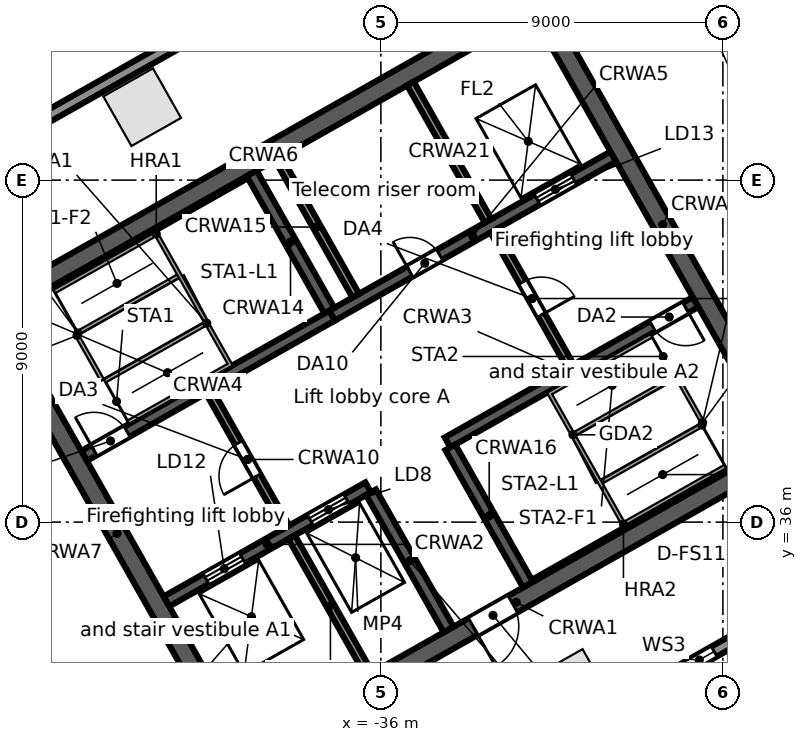
"""IFC4 building model, lengths in metres.
Left out: names, types, materials, properties, quantities, classifications, styles, units other than length and angle.
Written with IfcOpenShell. Run it as: python <this file> out.ifc"""

import sys

from ifc_helpers import new_model, si_unit, direction, frame, frame_2d, origin, origin_2d, place, context, subcontext, project, spatial, rectangle, extrude, element, fill, save


model = new_model("IFC4")
c1 = context("Model", 3, precision=1e-05, world=origin(), true_north=direction((0.0, 1.0)))
c2 = subcontext(c1, "Body", "Model", "MODEL_VIEW")
j1 = project(units=[si_unit("LENGTHUNIT", "METRE"), si_unit("PLANEANGLEUNIT", "RADIAN")], contexts=[c1])
p1 = place(None, origin())
s1 = spatial("IfcSite", under=j1, at=p1, CompositionType="ELEMENT")
p2 = place(p1, origin())
s2 = spatial("IfcBuilding", under=s1, at=p2, CompositionType="ELEMENT")
p3 = place(p2, frame((0.0, 0.0, 178.9)))
s3 = spatial("IfcBuildingStorey", under=s2, at=p3, CompositionType="ELEMENT", Elevation=178.9)
for number, where, z_axis, x_axis in (
    (1, (-42.28, 46.919, 0.0), (0.0, 0.0, 1.0), (-0.87, -0.492, 0.0)),
    (2, (-30.976, 31.635, 0.0), (0.0, 0.0, 1.0), (0.87, 0.492, 0.0)),
):
    element("IfcColumn", number, at=place(p3, frame(where, z_axis=z_axis, x_axis=x_axis)), inside=s3, PredefinedType="COLUMN", context=c2, shape_type="SweptSolid", body=[
        extrude(rectangle(XDim=1.5, YDim=1.5, at=origin_2d()), origin(), (0.0, 0.0, 1.0), 4.0),
    ])
p4 = place(p3, frame((-0.055, 47.969, 0.0), z_axis=(0.0, 0.0, 1.0), x_axis=(-0.870355730478, -0.492423499058, 0.0)))
e3 = element("IfcWall", 3, at=p4, inside=s3, PredefinedType="STANDARD", context=c2, shape_type="SweptSolid", body=[
    extrude(rectangle(XDim=43.75, YDim=0.3, at=frame_2d((21.875, 0.0))), origin(), (0.0, 0.0, 1.0), 3.68),
])
p5 = place(p4, frame((39.977, 0.0, 0.6)))
e4 = element("IfcOpeningElement", 4, at=p5, cuts=e3, PredefinedType="OPENING", context=c2, shape_type="SweptSolid", body=[
    extrude(rectangle(XDim=0.9, YDim=2.4, at=frame_2d((0.45, 1.2))), frame((0.0, 0.16, 0.0), z_axis=(0.0, -1.0, 0.0), x_axis=(1.0, 0.0, 0.0)), (0.0, 0.0, 1.0), 0.32),
])
p6 = place(p4, frame((37.338, 0.0, 0.0)))
e5 = element("IfcOpeningElement", 5, at=p6, cuts=e3, PredefinedType="OPENING", context=c2, shape_type="SweptSolid", body=[
    extrude(rectangle(XDim=1.8, YDim=2.4, at=frame_2d((0.9, 1.2))), frame((0.0, 0.16, 0.0), z_axis=(0.0, -1.0, 0.0), x_axis=(1.0, 0.0, 0.0)), (0.0, 0.0, 1.0), 0.32),
])
p7 = place(p4, frame((31.222, 0.0, 0.6)))
e6 = element("IfcOpeningElement", 6, at=p7, cuts=e3, PredefinedType="OPENING", context=c2, shape_type="SweptSolid", body=[
    extrude(rectangle(XDim=0.9, YDim=2.4, at=frame_2d((0.45, 1.2))), frame((0.0, 0.16, 0.0), z_axis=(0.0, -1.0, 0.0), x_axis=(1.0, 0.0, 0.0)), (0.0, 0.0, 1.0), 0.32),
])
p8 = place(p4, frame((28.584, 0.0, 0.0)))
e7 = element("IfcOpeningElement", 7, at=p8, cuts=e3, PredefinedType="OPENING", context=c2, shape_type="SweptSolid", body=[
    extrude(rectangle(XDim=1.8, YDim=2.4, at=frame_2d((0.9, 1.2))), frame((0.0, 0.16, 0.0), z_axis=(0.0, -1.0, 0.0), x_axis=(1.0, 0.0, 0.0)), (0.0, 0.0, 1.0), 0.32),
])
p9 = place(p4, frame((22.468, 0.0, 0.6)))
e8 = element("IfcOpeningElement", 8, at=p9, cuts=e3, PredefinedType="OPENING", context=c2, shape_type="SweptSolid", body=[
    extrude(rectangle(XDim=0.9, YDim=2.4, at=frame_2d((0.45, 1.2))), frame((0.0, 0.16, 0.0), z_axis=(0.0, -1.0, 0.0), x_axis=(1.0, 0.0, 0.0)), (0.0, 0.0, 1.0), 0.32),
])
p10 = place(p4, frame((19.829, 0.0, 0.0)))
e9 = element("IfcOpeningElement", 9, at=p10, cuts=e3, PredefinedType="OPENING", context=c2, shape_type="SweptSolid", body=[
    extrude(rectangle(XDim=1.8, YDim=2.4, at=frame_2d((0.9, 1.2))), frame((0.0, 0.16, 0.0), z_axis=(0.0, -1.0, 0.0), x_axis=(1.0, 0.0, 0.0)), (0.0, 0.0, 1.0), 0.32),
])
p11 = place(p4, frame((13.713, 0.0, 0.6)))
e10 = element("IfcOpeningElement", 10, at=p11, cuts=e3, PredefinedType="OPENING", context=c2, shape_type="SweptSolid", body=[
    extrude(rectangle(XDim=0.9, YDim=2.4, at=frame_2d((0.45, 1.2))), frame((0.0, 0.16, 0.0), z_axis=(0.0, -1.0, 0.0), x_axis=(1.0, 0.0, 0.0)), (0.0, 0.0, 1.0), 0.32),
])
p12 = place(p4, frame((11.075, 0.0, 0.0)))
e11 = element("IfcOpeningElement", 11, at=p12, cuts=e3, PredefinedType="OPENING", context=c2, shape_type="SweptSolid", body=[
    extrude(rectangle(XDim=1.8, YDim=2.4, at=frame_2d((0.9, 1.2))), frame((0.0, 0.16, 0.0), z_axis=(0.0, -1.0, 0.0), x_axis=(1.0, 0.0, 0.0)), (0.0, 0.0, 1.0), 0.32),
])
p13 = place(p4, frame((4.959, 0.0, 0.6)))
e12 = element("IfcOpeningElement", 12, at=p13, cuts=e3, PredefinedType="OPENING", context=c2, shape_type="SweptSolid", body=[
    extrude(rectangle(XDim=0.9, YDim=2.4, at=frame_2d((0.45, 1.2))), frame((0.0, 0.16, 0.0), z_axis=(0.0, -1.0, 0.0), x_axis=(1.0, 0.0, 0.0)), (0.0, 0.0, 1.0), 0.32),
])
p14 = place(p4, frame((2.32, 0.0, 0.0)))
e13 = element("IfcOpeningElement", 13, at=p14, cuts=e3, PredefinedType="OPENING", context=c2, shape_type="SweptSolid", body=[
    extrude(rectangle(XDim=1.8, YDim=2.4, at=frame_2d((0.9, 1.2))), frame((0.0, 0.16, 0.0), z_axis=(0.0, -1.0, 0.0), x_axis=(1.0, 0.0, 0.0)), (0.0, 0.0, 1.0), 0.32),
])
p15 = place(p3, frame((-58.745, 38.764, 0.0), z_axis=(0.0, 0.0, 1.0), x_axis=(0.870355811726, 0.492423355453, 0.0)))
e14 = element("IfcWall", 14, at=p15, inside=s3, PredefinedType="STANDARD", context=c2, shape_type="SweptSolid", body=[
    extrude(rectangle(XDim=64.025, YDim=0.3, at=frame_2d((32.013, 0.0))), origin(), (0.0, 0.0, 1.0), 3.68),
])
p16 = place(p15, frame((60.122, 0.0, 0.6)))
e15 = element("IfcOpeningElement", 15, at=p16, cuts=e14, PredefinedType="OPENING", context=c2, shape_type="SweptSolid", body=[
    extrude(rectangle(XDim=0.9, YDim=2.4, at=frame_2d((0.45, 1.2))), frame((0.0, 0.16, 0.0), z_axis=(0.0, -1.0, 0.0), x_axis=(1.0, 0.0, 0.0)), (0.0, 0.0, 1.0), 0.32),
])
p17 = place(p15, frame((50.992, 0.0, 0.6)))
e16 = element("IfcOpeningElement", 16, at=p17, cuts=e14, PredefinedType="OPENING", context=c2, shape_type="SweptSolid", body=[
    extrude(rectangle(XDim=0.9, YDim=2.4, at=frame_2d((0.45, 1.2))), frame((0.0, 0.16, 0.0), z_axis=(0.0, -1.0, 0.0), x_axis=(1.0, 0.0, 0.0)), (0.0, 0.0, 1.0), 0.32),
])
p18 = place(p15, frame((41.862, 0.0, 0.6)))
e17 = element("IfcOpeningElement", 17, at=p18, cuts=e14, PredefinedType="OPENING", context=c2, shape_type="SweptSolid", body=[
    extrude(rectangle(XDim=0.9, YDim=2.4, at=frame_2d((0.45, 1.2))), frame((0.0, 0.16, 0.0), z_axis=(0.0, -1.0, 0.0), x_axis=(1.0, 0.0, 0.0)), (0.0, 0.0, 1.0), 0.32),
])
p19 = place(p15, frame((32.732, 0.0, 0.6)))
e18 = element("IfcOpeningElement", 18, at=p19, cuts=e14, PredefinedType="OPENING", context=c2, shape_type="SweptSolid", body=[
    extrude(rectangle(XDim=0.9, YDim=2.4, at=frame_2d((0.45, 1.2))), frame((0.0, 0.16, 0.0), z_axis=(0.0, -1.0, 0.0), x_axis=(1.0, 0.0, 0.0)), (0.0, 0.0, 1.0), 0.32),
])
p20 = place(p15, frame((23.602, 0.0, 0.6)))
e19 = element("IfcOpeningElement", 19, at=p20, cuts=e14, PredefinedType="OPENING", context=c2, shape_type="SweptSolid", body=[
    extrude(rectangle(XDim=0.9, YDim=2.4, at=frame_2d((0.45, 1.2))), frame((0.0, 0.16, 0.0), z_axis=(0.0, -1.0, 0.0), x_axis=(1.0, 0.0, 0.0)), (0.0, 0.0, 1.0), 0.32),
])
p21 = place(p15, frame((14.472, 0.0, 0.6)))
e20 = element("IfcOpeningElement", 20, at=p21, cuts=e14, PredefinedType="OPENING", context=c2, shape_type="SweptSolid", body=[
    extrude(rectangle(XDim=0.9, YDim=2.4, at=frame_2d((0.45, 1.2))), frame((0.0, 0.16, 0.0), z_axis=(0.0, -1.0, 0.0), x_axis=(1.0, 0.0, 0.0)), (0.0, 0.0, 1.0), 0.32),
])
p22 = place(p15, frame((5.342, 0.0, 0.6)))
e21 = element("IfcOpeningElement", 21, at=p22, cuts=e14, PredefinedType="OPENING", context=c2, shape_type="SweptSolid", body=[
    extrude(rectangle(XDim=0.9, YDim=2.4, at=frame_2d((0.45, 1.2))), frame((0.0, 0.16, 0.0), z_axis=(0.0, -1.0, 0.0), x_axis=(1.0, 0.0, 0.0)), (0.0, 0.0, 1.0), 0.32),
])
p23 = place(p3, frame((-44.109, 26.504, 0.0), z_axis=(0.0, 0.0, 1.0), x_axis=(-0.857169502585, 0.515034410344, 0.0)))
e22 = element("IfcWall", 22, at=p23, inside=s3, PredefinedType="STANDARD", context=c2, shape_type="SweptSolid", body=[
    extrude(rectangle(XDim=17.127, YDim=0.3, at=frame_2d((8.563, 0.0))), origin(), (0.0, 0.0, 1.0), 3.68),
])
p24 = place(p23, frame((13.403, 0.0, 0.6)))
e23 = element("IfcOpeningElement", 23, at=p24, cuts=e22, PredefinedType="OPENING", context=c2, shape_type="SweptSolid", body=[
    extrude(rectangle(XDim=0.9, YDim=2.4, at=frame_2d((0.45, 1.2))), frame((0.0, 0.16, 0.0), z_axis=(0.0, -1.0, 0.0), x_axis=(1.0, 0.0, 0.0)), (0.0, 0.0, 1.0), 0.32),
])
p25 = place(p23, frame((4.903, 0.0, 0.6)))
e24 = element("IfcOpeningElement", 24, at=p25, cuts=e22, PredefinedType="OPENING", context=c2, shape_type="SweptSolid", body=[
    extrude(rectangle(XDim=0.9, YDim=2.4, at=frame_2d((0.45, 1.2))), frame((0.0, 0.16, 0.0), z_axis=(0.0, -1.0, 0.0), x_axis=(1.0, 0.0, 0.0)), (0.0, 0.0, 1.0), 0.32),
])
p26 = place(p3, frame((-39.838, 29.705, 0.0), z_axis=(0.0, 0.0, 1.0), x_axis=(0.870350116061, 0.492433422375, 0.0)))
e25 = element("IfcWall", 25, at=p26, inside=s3, PredefinedType="SOLIDWALL", context=c2, shape_type="SweptSolid", body=[
    extrude(rectangle(XDim=17.0, YDim=0.5, at=frame_2d((8.5, 0.0))), origin(), (0.0, 0.0, 1.0), 3.68),
])
p27 = place(p26, frame((7.2, 0.0, 0.0)))
e26 = element("IfcOpeningElement", 26, at=p27, cuts=e25, PredefinedType="OPENING", context=c2, shape_type="SweptSolid", body=[
    extrude(rectangle(XDim=1.2, YDim=2.1, at=frame_2d((0.6, 1.05))), frame((0.0, 0.26, 0.0), z_axis=(0.0, -1.0, 0.0), x_axis=(1.0, 0.0, 0.0)), (0.0, 0.0, 1.0), 0.52),
])
p28 = place(p3, frame((-41.643, 33.912, 0.0), z_axis=(0.0, 0.0, 1.0), x_axis=(0.870343599782, 0.492444939378, 0.0)))
e27 = element("IfcWall", 27, at=p28, inside=s3, PredefinedType="SOLIDWALL", context=c2, shape_type="SweptSolid", body=[
    extrude(rectangle(XDim=6.1, YDim=0.3, at=frame_2d((3.05, 0.0))), origin(), (0.0, 0.0, 1.0), 3.68),
])
p29 = place(p28, frame((1.2, 0.0, 0.0)))
e28 = element("IfcOpeningElement", 28, at=p29, cuts=e27, PredefinedType="OPENING", context=c2, shape_type="SweptSolid", body=[
    extrude(rectangle(XDim=1.1, YDim=2.1, at=frame_2d((0.55, 1.05))), frame((0.0, 0.16, 0.0), z_axis=(0.0, -1.0, 0.0), x_axis=(1.0, 0.0, 0.0)), (0.0, 0.0, 1.0), 0.32),
])
p30 = place(p28, frame((4.35, 0.0, 0.0)))
e29 = element("IfcOpeningElement", 29, at=p30, cuts=e27, PredefinedType="OPENING", context=c2, shape_type="SweptSolid", body=[
    extrude(rectangle(XDim=1.1, YDim=2.1, at=frame_2d((0.55, 1.05))), frame((0.0, 0.16, 0.0), z_axis=(0.0, -1.0, 0.0), x_axis=(1.0, 0.0, 0.0)), (0.0, 0.0, 1.0), 0.32),
])
p31 = place(p3, frame((-34.245, 38.097, 0.0), z_axis=(0.0, 0.0, 1.0), x_axis=(0.870364520461, 0.492407962489, 0.0)))
e30 = element("IfcWall", 30, at=p31, inside=s3, PredefinedType="SOLIDWALL", context=c2, shape_type="SweptSolid", body=[
    extrude(rectangle(XDim=7.5, YDim=0.3, at=frame_2d((3.75, 0.0))), origin(), (0.0, 0.0, 1.0), 3.68),
])
p32 = place(p31, frame((6.2, 0.0, 0.0)))
e31 = element("IfcOpeningElement", 31, at=p32, cuts=e30, PredefinedType="OPENING", context=c2, shape_type="SweptSolid", body=[
    extrude(rectangle(XDim=1.0, YDim=2.1, at=frame_2d((0.5, 1.05))), frame((0.0, 0.16, 0.0), z_axis=(0.0, -1.0, 0.0), x_axis=(1.0, 0.0, 0.0)), (0.0, 0.0, 1.0), 0.32),
])
p33 = place(p3, frame((-43.81, 37.741, 0.0), z_axis=(0.0, 0.0, 1.0), x_axis=(0.870350569555, 0.492432620848, 0.0)))
e32 = element("IfcWall", 32, at=p33, inside=s3, PredefinedType="SOLIDWALL", context=c2, shape_type="SweptSolid", body=[
    extrude(rectangle(XDim=7.5, YDim=0.3, at=frame_2d((3.75, 0.0))), origin(), (0.0, 0.0, 1.0), 3.68),
])
p34 = place(p33, frame((0.3, 0.0, 0.0)))
e33 = element("IfcOpeningElement", 33, at=p34, cuts=e32, PredefinedType="OPENING", context=c2, shape_type="SweptSolid", body=[
    extrude(rectangle(XDim=1.0, YDim=2.1, at=frame_2d((0.5, 1.05))), frame((0.0, 0.16, 0.0), z_axis=(0.0, -1.0, 0.0), x_axis=(1.0, 0.0, 0.0)), (0.0, 0.0, 1.0), 0.32),
])
p35 = place(p3, frame((-37.282, 41.435, 0.0), z_axis=(0.0, 0.0, 1.0), x_axis=(0.870356271124, 0.492422543467, 0.0)))
e34 = element("IfcWall", 34, at=p35, inside=s3, PredefinedType="SOLIDWALL", context=c2, shape_type="SweptSolid", body=[
    extrude(rectangle(XDim=8.5, YDim=0.3, at=frame_2d((4.25, 0.0))), origin(), (0.0, 0.0, 1.0), 3.68),
])
p36 = place(p35, frame((6.2, 0.0, 0.0)))
e35 = element("IfcOpeningElement", 35, at=p36, cuts=e34, PredefinedType="OPENING", context=c2, shape_type="SweptSolid", body=[
    extrude(rectangle(XDim=1.1, YDim=2.1, at=frame_2d((0.55, 1.05))), frame((0.0, 0.16, 0.0), z_axis=(0.0, -1.0, 0.0), x_axis=(1.0, 0.0, 0.0)), (0.0, 0.0, 1.0), 0.32),
])
p37 = place(p35, frame((2.35, 0.0, 0.0)))
e36 = element("IfcOpeningElement", 36, at=p37, cuts=e34, PredefinedType="OPENING", context=c2, shape_type="SweptSolid", body=[
    extrude(rectangle(XDim=0.9, YDim=2.1, at=frame_2d((0.45, 1.05))), frame((0.0, 0.16, 0.0), z_axis=(0.0, -1.0, 0.0), x_axis=(1.0, 0.0, 0.0)), (0.0, 0.0, 1.0), 0.32),
])
p38 = place(p3, frame((-46.486, 41.455, 0.0), z_axis=(0.0, 0.0, 1.0), x_axis=(0.870353598469, 0.492427267353, 0.0)))
e37 = element("IfcWall", 37, at=p38, inside=s3, PredefinedType="SOLIDWALL", context=c2, shape_type="SweptSolid", body=[
    extrude(rectangle(XDim=17.0, YDim=0.5, at=frame_2d((8.5, 0.0))), origin(), (0.0, 0.0, 1.0), 3.68),
])
p39 = place(p3, frame((-46.145, 41.361, 0.0), z_axis=(0.0, 0.0, 1.0), x_axis=(0.492435316254, -0.870349044525, 0.0)))
e38 = element("IfcWall", 38, at=p39, inside=s3, PredefinedType="SOLIDWALL", context=c2, shape_type="SweptSolid", body=[
    extrude(rectangle(XDim=13.0, YDim=0.5, at=frame_2d((6.5, 0.0))), origin(), (0.0, 0.0, 1.0), 3.68),
])
p40 = place(p3, frame((-38.349, 35.603, 0.0), z_axis=(0.0, 0.0, 1.0), x_axis=(0.492396453737, -0.870371031427, 0.0)))
e39 = element("IfcWall", 39, at=p40, inside=s3, PredefinedType="SOLIDWALL", context=c2, shape_type="SweptSolid", body=[
    extrude(rectangle(XDim=4.15, YDim=0.2, at=frame_2d((2.075, 0.0))), origin(), (0.0, 0.0, 1.0), 3.68),
])
p41 = place(p3, frame((-40.516, 39.433, 0.0), z_axis=(0.0, 0.0, 1.0), x_axis=(0.492453559952, -0.87033872216, 0.0)))
e40 = element("IfcWall", 40, at=p41, inside=s3, PredefinedType="PARTITIONING", context=c2, shape_type="SweptSolid", body=[
    extrude(rectangle(XDim=4.1, YDim=0.2, at=frame_2d((2.05, 0.0))), origin(), (0.0, 0.0, 1.0), 3.68),
])
p42 = place(p41, frame((1.55, 0.0, 0.0)))
e41 = element("IfcOpeningElement", 41, at=p42, cuts=e40, PredefinedType="OPENING", context=c2, shape_type="SweptSolid", body=[
    extrude(rectangle(XDim=1.0, YDim=2.1, at=frame_2d((0.5, 1.05))), frame((0.0, 0.11, 0.0), z_axis=(0.0, -1.0, 0.0), x_axis=(1.0, 0.0, 0.0)), (0.0, 0.0, 1.0), 0.22),
])
for number, where, z_axis, x_axis in (
    (42, (-36.26, 36.785, 0.0), (0.0, 0.0, 1.0), (0.492, -0.87, 0.0)),
    (43, (-39.399, 45.177, 0.0), (0.0, 0.0, 1.0), (0.492, -0.87, 0.0)),
):
    element("IfcWall", number, at=place(p3, frame(where, z_axis=z_axis, x_axis=x_axis)), inside=s3, PredefinedType="SOLIDWALL", context=c2, shape_type="SweptSolid", body=[
        extrude(rectangle(XDim=4.15, YDim=0.3, at=frame_2d((2.075, 0.0))), origin(), (0.0, 0.0, 1.0), 3.68),
    ])
p43 = place(p3, frame((-38.703, 45.571, 0.0), z_axis=(0.0, 0.0, 1.0), x_axis=(0.492396453737, -0.870371031427, 0.0)))
e44 = element("IfcWall", 44, at=p43, inside=s3, PredefinedType="SOLIDWALL", context=c2, shape_type="SweptSolid", body=[
    extrude(rectangle(XDim=4.15, YDim=0.2, at=frame_2d((2.075, 0.0))), origin(), (0.0, 0.0, 1.0), 3.68),
])
p44 = place(p3, frame((-34.171, 37.967, 0.0), z_axis=(0.0, 0.0, 1.0), x_axis=(0.492396453737, -0.870371031427, 0.0)))
e45 = element("IfcWall", 45, at=p44, inside=s3, PredefinedType="SOLIDWALL", context=c2, shape_type="SweptSolid", body=[
    extrude(rectangle(XDim=4.15, YDim=0.3, at=frame_2d((2.075, 0.0))), origin(), (0.0, 0.0, 1.0), 3.68),
])
p45 = place(p3, frame((-33.031, 43.667, 0.0), z_axis=(0.0, 0.0, 1.0), x_axis=(0.492408451753, -0.87036424366, 0.0)))
e46 = element("IfcWall", 46, at=p45, inside=s3, PredefinedType="PARTITIONING", context=c2, shape_type="SweptSolid", body=[
    extrude(rectangle(XDim=4.1, YDim=0.2, at=frame_2d((2.05, 0.0))), origin(), (0.0, 0.0, 1.0), 3.68),
])
p46 = place(p45, frame((1.55, 0.0, 0.0)))
e47 = element("IfcOpeningElement", 47, at=p46, cuts=e46, PredefinedType="OPENING", context=c2, shape_type="SweptSolid", body=[
    extrude(rectangle(XDim=1.0, YDim=2.1, at=frame_2d((0.5, 1.05))), frame((0.0, 0.11, 0.0), z_axis=(0.0, -1.0, 0.0), x_axis=(1.0, 0.0, 0.0)), (0.0, 0.0, 1.0), 0.22),
])
p47 = place(p3, frame((-35.222, 47.541, 0.0), z_axis=(0.0, 0.0, 1.0), x_axis=(0.492421666909, -0.870356767055, 0.0)))
e48 = element("IfcWall", 48, at=p47, inside=s3, PredefinedType="SOLIDWALL", context=c2, shape_type="SweptSolid", body=[
    extrude(rectangle(XDim=4.15, YDim=0.2, at=frame_2d((2.075, 0.0))), origin(), (0.0, 0.0, 1.0), 3.68),
])
p48 = place(p3, frame((-31.784, 49.486, 0.0), z_axis=(0.0, 0.0, 1.0), x_axis=(0.492435316254, -0.870349044525, 0.0)))
e49 = element("IfcWall", 49, at=p48, inside=s3, PredefinedType="SOLIDWALL", context=c2, shape_type="SweptSolid", body=[
    extrude(rectangle(XDim=13.0, YDim=0.5, at=frame_2d((6.5, 0.0))), origin(), (0.0, 0.0, 1.0), 3.68),
])
p49 = place(p3, frame((-28.799, 55.534, 0.0), z_axis=(0.0, 0.0, 1.0), x_axis=(0.488587464104, -0.872514922463, 0.0)))
e50 = element("IfcWall", 50, at=p49, inside=s3, PredefinedType="PARTITIONING", context=c2, shape_type="SweptSolid", body=[
    extrude(rectangle(XDim=17.295, YDim=0.125, at=frame_2d((8.647, 0.0))), origin(), (0.0, 0.0, 1.0), 2.852),
])
p50 = place(p7, origin())
e51 = element("IfcWindow", 51, at=p50, inside=s3, PartitioningType="SINGLE_PANEL", PredefinedType="WINDOW", context=c2, shape_type="SweptSolid", body=[
    extrude(rectangle(XDim=0.9, YDim=2.4, at=frame_2d((0.45, 1.2))), frame((0.0, 0.03, 0.0), z_axis=(0.0, -1.0, 0.0), x_axis=(1.0, 0.0, 0.0)), (0.0, 0.0, 1.0), 0.06),
])
fill(e6, e51)
p51 = place(p36, origin())
e52 = element("IfcDoor", 52, at=p51, inside=s3, OperationType="DOUBLE_DOOR_SLIDING", PredefinedType="DOOR", context=c2, shape_type="SweptSolid", body=[
    extrude(rectangle(XDim=1.1, YDim=2.1, at=frame_2d((0.55, 1.05))), frame((0.0, 0.025, 0.0), z_axis=(0.0, -1.0, 0.0), x_axis=(1.0, 0.0, 0.0)), (0.0, 0.0, 1.0), 0.05),
])
fill(e35, e52)
p52 = place(p29, origin())
e53 = element("IfcDoor", 53, at=p52, inside=s3, OperationType="DOUBLE_DOOR_SLIDING", PredefinedType="DOOR", context=c2, shape_type="SweptSolid", body=[
    extrude(rectangle(XDim=1.1, YDim=2.1, at=frame_2d((0.55, 1.05))), frame((0.0, 0.025, 0.0), z_axis=(0.0, -1.0, 0.0), x_axis=(1.0, 0.0, 0.0)), (0.0, 0.0, 1.0), 0.05),
])
fill(e28, e53)
p53 = place(p30, origin())
e54 = element("IfcDoor", 54, at=p53, inside=s3, OperationType="DOUBLE_DOOR_SLIDING", PredefinedType="DOOR", context=c2, shape_type="SweptSolid", body=[
    extrude(rectangle(XDim=1.1, YDim=2.1, at=frame_2d((0.55, 1.05))), frame((0.0, 0.025, 0.0), z_axis=(0.0, -1.0, 0.0), x_axis=(1.0, 0.0, 0.0)), (0.0, 0.0, 1.0), 0.05),
])
fill(e29, e54)
p54 = place(p34, origin())
e55 = element("IfcDoor", 55, at=p54, inside=s3, OperationType="SINGLE_SWING_LEFT", PredefinedType="DOOR", context=c2, shape_type="SweptSolid", body=[
    extrude(rectangle(XDim=1.0, YDim=2.1, at=frame_2d((0.5, 1.05))), frame((0.0, 0.025, 0.0), z_axis=(0.0, -1.0, 0.0), x_axis=(1.0, 0.0, 0.0)), (0.0, 0.0, 1.0), 0.05),
])
fill(e33, e55)
p55 = place(p32, frame((1.0, 0.0, 0.0), z_axis=(0.0, 0.0, 1.0), x_axis=(-1.0, 0.0, 0.0)))
e56 = element("IfcDoor", 56, at=p55, inside=s3, OperationType="SINGLE_SWING_LEFT", PredefinedType="DOOR", context=c2, shape_type="SweptSolid", body=[
    extrude(rectangle(XDim=1.0, YDim=2.1, at=frame_2d((0.5, 1.05))), frame((0.0, 0.025, 0.0), z_axis=(0.0, -1.0, 0.0), x_axis=(1.0, 0.0, 0.0)), (0.0, 0.0, 1.0), 0.05),
])
fill(e31, e56)
p56 = place(p42, frame((1.0, 0.0, 0.0), z_axis=(0.0, 0.0, 1.0), x_axis=(-1.0, 0.0, 0.0)))
e57 = element("IfcDoor", 57, at=p56, inside=s3, OperationType="SINGLE_SWING_LEFT", PredefinedType="DOOR", context=c2, shape_type="SweptSolid", body=[
    extrude(rectangle(XDim=1.0, YDim=2.1, at=frame_2d((0.5, 1.05))), frame((0.0, 0.025, 0.0), z_axis=(0.0, -1.0, 0.0), x_axis=(1.0, 0.0, 0.0)), (0.0, 0.0, 1.0), 0.05),
])
fill(e41, e57)
p57 = place(p46, origin())
e58 = element("IfcDoor", 58, at=p57, inside=s3, OperationType="SINGLE_SWING_RIGHT", PredefinedType="DOOR", context=c2, shape_type="SweptSolid", body=[
    extrude(rectangle(XDim=1.0, YDim=2.1, at=frame_2d((0.5, 1.05))), frame((0.0, 0.025, 0.0), z_axis=(0.0, -1.0, 0.0), x_axis=(1.0, 0.0, 0.0)), (0.0, 0.0, 1.0), 0.05),
])
fill(e47, e58)
p58 = place(p27, frame((1.2, 0.0, 0.0), z_axis=(0.0, 0.0, 1.0), x_axis=(-1.0, 0.0, 0.0)))
e59 = element("IfcDoor", 59, at=p58, inside=s3, OperationType="SINGLE_SWING_RIGHT", PredefinedType="DOOR", context=c2, shape_type="SweptSolid", body=[
    extrude(rectangle(XDim=1.2, YDim=2.1, at=frame_2d((0.6, 1.05))), frame((0.0, 0.025, 0.0), z_axis=(0.0, -1.0, 0.0), x_axis=(1.0, 0.0, 0.0)), (0.0, 0.0, 1.0), 0.05),
])
fill(e26, e59)
p59 = place(p37, origin())
e60 = element("IfcDoor", 60, at=p59, inside=s3, OperationType="SINGLE_SWING_LEFT", PredefinedType="DOOR", context=c2, shape_type="SweptSolid", body=[
    extrude(rectangle(XDim=0.9, YDim=2.1, at=frame_2d((0.45, 1.05))), frame((0.0, 0.025, 0.0), z_axis=(0.0, -1.0, 0.0), x_axis=(1.0, 0.0, 0.0)), (0.0, 0.0, 1.0), 0.05),
])
fill(e36, e60)
save(model, sys.argv[1])
